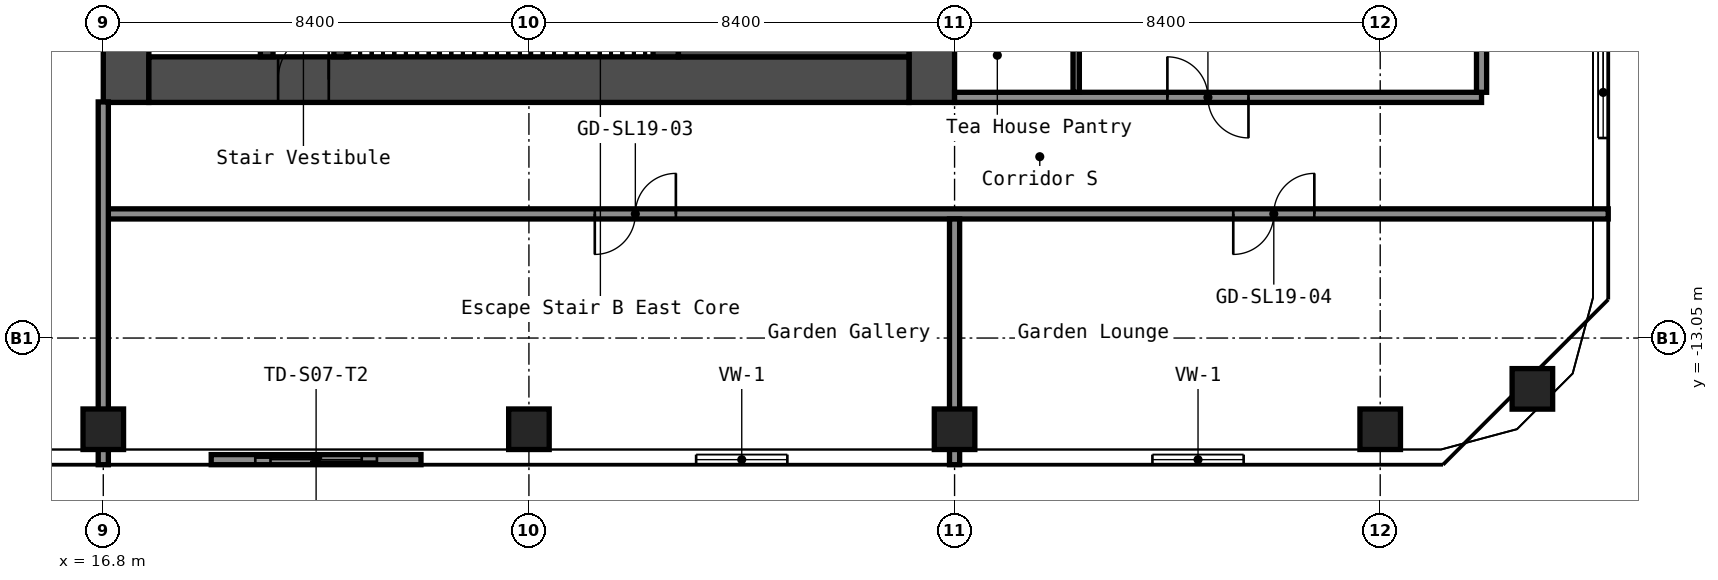
"""IFC4 building model, lengths in metres.
Left out: names, types, materials, properties, quantities, classifications, styles, units other than length and angle.
Written with IfcOpenShell. Run it as: python <this file> out.ifc"""

import sys

from ifc_helpers import new_model, si_unit, direction, frame, frame_2d, origin, origin_2d, place, context, subcontext, project, spatial, rectangle, hollow_rectangle, extrude, element, fill, save


model = new_model("IFC4")
c1 = context("Model", 3, precision=1e-05, world=origin(), true_north=direction((0.0, 1.0)))
c2 = subcontext(c1, "Body", "Model", "MODEL_VIEW")
j1 = project(units=[si_unit("LENGTHUNIT", "METRE"), si_unit("PLANEANGLEUNIT", "RADIAN")], contexts=[c1])
p1 = place(None, origin())
s1 = spatial("IfcSite", under=j1, at=p1, CompositionType="ELEMENT")
p2 = place(p1, origin())
s2 = spatial("IfcBuilding", under=s1, at=p2, CompositionType="ELEMENT")
p3 = place(p2, frame((0.0, 0.0, 69.0)))
s3 = spatial("IfcBuildingStorey", under=s2, at=p3, CompositionType="ELEMENT", Elevation=69.0)
for number, where, z_axis, x_axis in (
    (1, (16.8, -14.85, 0.0), (0.0, 0.0, 1.0), (1.0, 0.0, 0.0)),
    (2, (25.2, -14.85, 0.0), (0.0, 0.0, 1.0), (1.0, 0.0, 0.0)),
    (3, (33.6, -14.85, 0.0), (0.0, 0.0, 1.0), (1.0, 0.0, 0.0)),
    (4, (42.0, -14.85, 0.0), (0.0, 0.0, 1.0), (1.0, 0.0, 0.0)),
    (5, (45.003, -14.053, 0.0), (0.0, 0.0, 1.0), (1.0, 0.0, 0.0)),
):
    element("IfcColumn", number, at=place(p3, frame(where, z_axis=z_axis, x_axis=x_axis)), inside=s3, PredefinedType="COLUMN", context=c2, shape_type="SweptSolid", body=[
        extrude(hollow_rectangle(XDim=0.8, YDim=0.8, WallThickness=0.032, at=origin_2d()), origin(), (0.0, 0.0, 1.0), 6.0),
    ])
p4 = place(p3, frame((17.25, -8.4, 0.0), z_axis=(0.0, 0.0, 1.0), x_axis=(0.0, 1.0, 0.0)))
e6 = element("IfcWall", 6, at=p4, inside=s3, PredefinedType="SHEAR", context=c2, shape_type="SweptSolid", body=[
    extrude(rectangle(XDim=16.8, YDim=0.9, at=frame_2d((8.4, 0.0))), origin(), (0.0, 0.0, 1.0), 6.0),
])
p5 = place(p4, frame((7.6, 0.0, 0.0)))
e7 = element("IfcOpeningElement", 7, at=p5, cuts=e6, PredefinedType="OPENING", context=c2, shape_type="SweptSolid", body=[
    extrude(rectangle(XDim=1.2, YDim=2.1, at=frame_2d((0.6, 1.05))), frame((0.0, 0.46, 0.0), z_axis=(0.0, -1.0, 0.0), x_axis=(1.0, 0.0, 0.0)), (0.0, 0.0, 1.0), 0.92),
])
p6 = place(p3, frame((33.15, -8.4, 0.0), z_axis=(0.0, 0.0, 1.0), x_axis=(0.0, 1.0, 0.0)))
e8 = element("IfcWall", 8, at=p6, inside=s3, PredefinedType="SHEAR", context=c2, shape_type="SweptSolid", body=[
    extrude(rectangle(XDim=16.8, YDim=0.9, at=frame_2d((8.4, 0.0))), origin(), (0.0, 0.0, 1.0), 6.0),
])
p7 = place(p3, frame((17.7, -7.95, 0.0), z_axis=(0.0, 0.0, 1.0), x_axis=(1.0, 0.0, 0.0)))
e9 = element("IfcWall", 9, at=p7, inside=s3, PredefinedType="SHEAR", context=c2, shape_type="SweptSolid", body=[
    extrude(rectangle(XDim=15.0, YDim=0.9, at=frame_2d((7.5, 0.0))), origin(), (0.0, 0.0, 1.0), 6.0),
])
p8 = place(p7, frame((2.55, 0.0, 0.0)))
e10 = element("IfcOpeningElement", 10, at=p8, cuts=e9, PredefinedType="OPENING", context=c2, shape_type="SweptSolid", body=[
    extrude(rectangle(XDim=1.0, YDim=2.1, at=frame_2d((0.5, 1.05))), frame((0.0, 0.46, 0.0), z_axis=(0.0, -1.0, 0.0), x_axis=(1.0, 0.0, 0.0)), (0.0, 0.0, 1.0), 0.92),
])
p9 = place(p3, frame((20.025, -7.5, 0.0), z_axis=(0.0, 0.0, 1.0), x_axis=(0.0, 1.0, 0.0)))
e11 = element("IfcWall", 11, at=p9, inside=s3, PredefinedType="SHEAR", context=c2, shape_type="SweptSolid", body=[
    extrude(rectangle(XDim=6.3, YDim=0.25, at=frame_2d((3.15, 0.0))), origin(), (0.0, 0.0, 1.0), 6.0),
])
p10 = place(p9, frame((2.4, 0.0, 0.0)))
e12 = element("IfcOpeningElement", 12, at=p10, cuts=e11, PredefinedType="OPENING", context=c2, shape_type="SweptSolid", body=[
    extrude(rectangle(XDim=1.0, YDim=2.1, at=frame_2d((0.5, 1.05))), frame((0.0, 0.135, 0.0), z_axis=(0.0, -1.0, 0.0), x_axis=(1.0, 0.0, 0.0)), (0.0, 0.0, 1.0), 0.27),
])
p11 = place(p3, frame((21.475, -7.5, 0.0), z_axis=(0.0, 0.0, 1.0), x_axis=(0.0, 1.0, 0.0)))
e13 = element("IfcWall", 13, at=p11, inside=s3, PredefinedType="SHEAR", context=c2, shape_type="SweptSolid", body=[
    extrude(rectangle(XDim=3.75, YDim=0.25, at=frame_2d((1.875, 0.0))), origin(), (0.0, 0.0, 1.0), 6.0),
])
p12 = place(p11, frame((1.3, 0.0, 0.0)))
e14 = element("IfcOpeningElement", 14, at=p12, cuts=e13, PredefinedType="OPENING", context=c2, shape_type="SweptSolid", body=[
    extrude(rectangle(XDim=1.2, YDim=2.1, at=frame_2d((0.6, 1.05))), frame((0.0, 0.135, 0.0), z_axis=(0.0, -1.0, 0.0), x_axis=(1.0, 0.0, 0.0)), (0.0, 0.0, 1.0), 0.27),
])
p13 = place(p3, frame((27.9, -7.5, 0.0), z_axis=(0.0, 0.0, 1.0), x_axis=(0.0, 1.0, 0.0)))
e15 = element("IfcWall", 15, at=p13, inside=s3, PredefinedType="SHEAR", context=c2, shape_type="SweptSolid", body=[
    extrude(rectangle(XDim=3.75, YDim=0.5, at=frame_2d((1.875, 0.0))), origin(), (0.0, 0.0, 1.0), 6.0),
])
p14 = place(p3, frame((28.15, -6.75, 0.0), z_axis=(0.0, 0.0, 1.0), x_axis=(1.0, 0.0, 0.0)))
e16 = element("IfcWall", 16, at=p14, inside=s3, PredefinedType="SHEAR", context=c2, shape_type="SweptSolid", body=[
    extrude(rectangle(XDim=4.55, YDim=1.5, at=frame_2d((2.275, 0.0))), origin(), (0.0, 0.0, 1.0), 6.0),
])
p15 = place(p3, frame((16.8, -10.6, 0.0), z_axis=(0.0, 0.0, 1.0), x_axis=(1.0, 0.0, 0.0)))
e17 = element("IfcWall", 17, at=p15, inside=s3, PredefinedType="PARTITIONING", context=c2, shape_type="SweptSolid", body=[
    extrude(rectangle(XDim=29.7, YDim=0.2, at=frame_2d((14.85, 0.0))), origin(), (0.0, 0.0, 1.0), 6.0),
])
p16 = place(p15, frame((9.7, 0.0, 0.0)))
e18 = element("IfcOpeningElement", 18, at=p16, cuts=e17, PredefinedType="OPENING", context=c2, shape_type="SweptSolid", body=[
    extrude(rectangle(XDim=1.6, YDim=2.1, at=frame_2d((0.8, 1.05))), frame((0.0, 0.11, 0.0), z_axis=(0.0, -1.0, 0.0), x_axis=(1.0, 0.0, 0.0)), (0.0, 0.0, 1.0), 0.22),
])
p17 = place(p15, frame((22.3, 0.0, 0.0)))
e19 = element("IfcOpeningElement", 19, at=p17, cuts=e17, PredefinedType="OPENING", context=c2, shape_type="SweptSolid", body=[
    extrude(rectangle(XDim=1.6, YDim=2.1, at=frame_2d((0.8, 1.05))), frame((0.0, 0.11, 0.0), z_axis=(0.0, -1.0, 0.0), x_axis=(1.0, 0.0, 0.0)), (0.0, 0.0, 1.0), 0.22),
])
p18 = place(p3, frame((33.6, -8.3, 0.0), z_axis=(0.0, 0.0, 1.0), x_axis=(1.0, 0.0, 0.0)))
e20 = element("IfcWall", 20, at=p18, inside=s3, PredefinedType="PARTITIONING", context=c2, shape_type="SweptSolid", body=[
    extrude(rectangle(XDim=10.4, YDim=0.2, at=frame_2d((5.2, 0.0))), origin(), (0.0, 0.0, 1.0), 6.0),
])
p19 = place(p18, frame((4.2, 0.0, 0.0)))
e21 = element("IfcOpeningElement", 21, at=p19, cuts=e20, PredefinedType="OPENING", context=c2, shape_type="SweptSolid", body=[
    extrude(rectangle(XDim=1.6, YDim=2.1, at=frame_2d((0.8, 1.05))), frame((0.0, 0.11, 0.0), z_axis=(0.0, -1.0, 0.0), x_axis=(1.0, 0.0, 0.0)), (0.0, 0.0, 1.0), 0.22),
])
p20 = place(p3, frame((16.8, -15.55, 0.0), z_axis=(0.0, 0.0, 1.0), x_axis=(0.0, 1.0, 0.0)))
e22 = element("IfcWall", 22, at=p20, inside=s3, PredefinedType="PARTITIONING", context=c2, shape_type="SweptSolid", body=[
    extrude(rectangle(XDim=7.16, YDim=0.2, at=frame_2d((3.58, 0.0))), origin(), (0.0, 0.0, 1.0), 6.0),
])
p21 = place(p3, frame((33.6, -15.55, 0.0), z_axis=(0.0, 0.0, 1.0), x_axis=(0.0, 1.0, 0.0)))
e23 = element("IfcWall", 23, at=p21, inside=s3, PredefinedType="PARTITIONING", context=c2, shape_type="SweptSolid", body=[
    extrude(rectangle(XDim=4.85, YDim=0.2, at=frame_2d((2.425, 0.0))), origin(), (0.0, 0.0, 1.0), 6.0),
])
p22 = place(p3, frame((36.0, -8.2, 0.0), z_axis=(0.0, 0.0, 1.0), x_axis=(0.0, 1.0, 0.0)))
e24 = element("IfcWall", 24, at=p22, inside=s3, PredefinedType="PARTITIONING", context=c2, shape_type="SweptSolid", body=[
    extrude(rectangle(XDim=2.5, YDim=0.125, at=frame_2d((1.25, 0.0))), origin(), (0.0, 0.0, 1.0), 6.0),
])
p23 = place(p22, frame((1.05, 0.0, 0.0)))
e25 = element("IfcOpeningElement", 25, at=p23, cuts=e24, PredefinedType="OPENING", context=c2, shape_type="SweptSolid", body=[
    extrude(rectangle(XDim=0.9, YDim=2.1, at=frame_2d((0.45, 1.05))), frame((0.0, 0.073, 0.0), z_axis=(0.0, -1.0, 0.0), x_axis=(1.0, 0.0, 0.0)), (0.0, 0.0, 1.0), 0.145),
])
p24 = place(p3, frame((44.0, -8.2, 0.0), z_axis=(0.0, 0.0, 1.0), x_axis=(0.0, 1.0, 0.0)))
e26 = element("IfcWall", 26, at=p24, inside=s3, PredefinedType="PARTITIONING", context=c2, shape_type="SweptSolid", body=[
    extrude(rectangle(XDim=16.4, YDim=0.2, at=frame_2d((8.2, 0.0))), origin(), (0.0, 0.0, 1.0), 6.0),
])
p25 = place(p3, frame((46.4, -12.26, 4.45), z_axis=(0.0, 0.0, 1.0), x_axis=(0.0, 1.0, 0.0)))
p26 = place(p25, frame((3.157, 0.0, 0.25)))
p27 = place(p26, origin())
e27 = element("IfcWindow", 27, at=p27, inside=s3, PartitioningType="SINGLE_PANEL", PredefinedType="WINDOW", context=c2, shape_type="SweptSolid", body=[
    extrude(rectangle(XDim=1.8, YDim=0.9, at=frame_2d((0.9, 0.45))), frame((0.0, 0.03, 0.0), z_axis=(0.0, -1.0, 0.0), x_axis=(1.0, 0.0, 0.0)), (0.0, 0.0, 1.0), 0.06),
])
p28 = place(p3, frame((16.8, -15.45, 4.45), z_axis=(0.0, 0.0, 1.0), x_axis=(1.0, 0.0, 0.0)))
p29 = place(p28, frame((3.3, 0.0, 0.25)))
p30 = place(p29, origin())
e28 = element("IfcWindow", 28, at=p30, inside=s3, PartitioningType="SINGLE_PANEL", PredefinedType="WINDOW", context=c2, shape_type="SweptSolid", body=[
    extrude(rectangle(XDim=1.8, YDim=0.9, at=frame_2d((0.9, 0.45))), frame((0.0, 0.03, 0.0), z_axis=(0.0, -1.0, 0.0), x_axis=(1.0, 0.0, 0.0)), (0.0, 0.0, 1.0), 0.06),
])
p31 = place(p3, frame((25.2, -15.45, 4.45), z_axis=(0.0, 0.0, 1.0), x_axis=(1.0, 0.0, 0.0)))
p32 = place(p31, frame((3.3, 0.0, 0.25)))
p33 = place(p32, origin())
e29 = element("IfcWindow", 29, at=p33, inside=s3, PartitioningType="SINGLE_PANEL", PredefinedType="WINDOW", context=c2, shape_type="SweptSolid", body=[
    extrude(rectangle(XDim=1.8, YDim=0.9, at=frame_2d((0.9, 0.45))), frame((0.0, 0.03, 0.0), z_axis=(0.0, -1.0, 0.0), x_axis=(1.0, 0.0, 0.0)), (0.0, 0.0, 1.0), 0.06),
])
p34 = place(p3, frame((33.6, -15.45, 4.45), z_axis=(0.0, 0.0, 1.0), x_axis=(1.0, 0.0, 0.0)))
p35 = place(p34, frame((3.905, 0.0, 0.25)))
p36 = place(p35, origin())
e30 = element("IfcWindow", 30, at=p36, inside=s3, PartitioningType="SINGLE_PANEL", PredefinedType="WINDOW", context=c2, shape_type="SweptSolid", body=[
    extrude(rectangle(XDim=1.8, YDim=0.9, at=frame_2d((0.9, 0.45))), frame((0.0, 0.03, 0.0), z_axis=(0.0, -1.0, 0.0), x_axis=(1.0, 0.0, 0.0)), (0.0, 0.0, 1.0), 0.06),
])
p37 = place(p3, frame((18.93, -15.45, 0.0), z_axis=(0.0, 0.0, 1.0), x_axis=(1.0, 0.0, 0.0)))
p38 = place(p37, frame((0.87, 0.0, 0.0)))
p39 = place(p38, frame((2.4, 0.0, 0.0), z_axis=(0.0, 0.0, 1.0), x_axis=(-1.0, 0.0, 0.0)))
e31 = element("IfcDoor", 31, at=p39, inside=s3, OperationType="SLIDING_TO_LEFT", PredefinedType="DOOR", context=c2, shape_type="SweptSolid", body=[
    extrude(rectangle(XDim=2.4, YDim=2.2, at=frame_2d((1.2, 1.1))), frame((0.0, 0.025, 0.0), z_axis=(0.0, -1.0, 0.0), x_axis=(1.0, 0.0, 0.0)), (0.0, 0.0, 1.0), 0.05),
])
p40 = place(p8, origin())
e32 = element("IfcDoor", 32, at=p40, inside=s3, OperationType="SINGLE_SWING_LEFT", PredefinedType="DOOR", context=c2, shape_type="SweptSolid", body=[
    extrude(rectangle(XDim=1.0, YDim=2.1, at=frame_2d((0.5, 1.05))), frame((0.0, 0.025, 0.0), z_axis=(0.0, -1.0, 0.0), x_axis=(1.0, 0.0, 0.0)), (0.0, 0.0, 1.0), 0.05),
])
fill(e10, e32)
p41 = place(p16, origin())
e33 = element("IfcDoor", 33, at=p41, inside=s3, OperationType="DOUBLE_DOOR_SINGLE_SWING", PredefinedType="DOOR", context=c2, shape_type="SweptSolid", body=[
    extrude(rectangle(XDim=1.6, YDim=2.1, at=frame_2d((0.8, 1.05))), frame((0.0, 0.025, 0.0), z_axis=(0.0, -1.0, 0.0), x_axis=(1.0, 0.0, 0.0)), (0.0, 0.0, 1.0), 0.05),
])
fill(e18, e33)
p42 = place(p17, origin())
e34 = element("IfcDoor", 34, at=p42, inside=s3, OperationType="DOUBLE_DOOR_SINGLE_SWING", PredefinedType="DOOR", context=c2, shape_type="SweptSolid", body=[
    extrude(rectangle(XDim=1.6, YDim=2.1, at=frame_2d((0.8, 1.05))), frame((0.0, 0.025, 0.0), z_axis=(0.0, -1.0, 0.0), x_axis=(1.0, 0.0, 0.0)), (0.0, 0.0, 1.0), 0.05),
])
fill(e19, e34)
p43 = place(p19, origin())
e35 = element("IfcDoor", 35, at=p43, inside=s3, OperationType="DOUBLE_DOOR_SINGLE_SWING", PredefinedType="DOOR", context=c2, shape_type="SweptSolid", body=[
    extrude(rectangle(XDim=1.6, YDim=2.1, at=frame_2d((0.8, 1.05))), frame((0.0, 0.025, 0.0), z_axis=(0.0, -1.0, 0.0), x_axis=(1.0, 0.0, 0.0)), (0.0, 0.0, 1.0), 0.05),
])
fill(e21, e35)
save(model, sys.argv[1])
